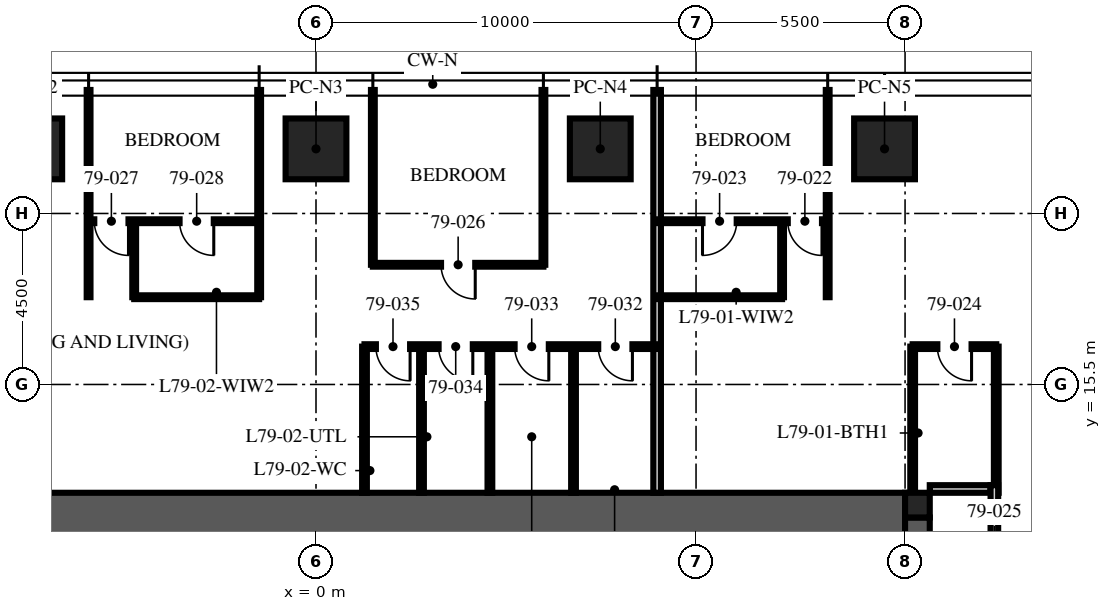
"""IFC4 building model, lengths in metres.
Left out: names, types, materials, properties, quantities, classifications, styles, units other than length and angle.
Written with IfcOpenShell. Run it as: python <this file> out.ifc"""

import sys

from ifc_helpers import new_model, si_unit, direction, frame, frame_2d, origin, origin_2d, place, context, subcontext, project, spatial, rectangle, extrude, element, fill, save


model = new_model("IFC4")
c1 = context("Model", 3, precision=1e-05, world=origin(), true_north=direction((0.0, 1.0)))
c2 = subcontext(c1, "Body", "Model", "MODEL_VIEW")
j1 = project(units=[si_unit("LENGTHUNIT", "METRE"), si_unit("PLANEANGLEUNIT", "RADIAN")], contexts=[c1])
p1 = place(None, origin())
s1 = spatial("IfcSite", under=j1, at=p1, CompositionType="ELEMENT")
p2 = place(p1, origin())
s2 = spatial("IfcBuilding", under=s1, at=p2, CompositionType="ELEMENT")
p3 = place(p2, frame((0.0, 0.0, 315.75)))
s3 = spatial("IfcBuildingStorey", under=s2, at=p3, CompositionType="ELEMENT", Elevation=315.75)
p4 = place(p3, frame((15.5, -12.0, -0.25), z_axis=(0.0, 0.0, 1.0), x_axis=(0.0, 1.0, 0.0)))
e1 = element("IfcWall", 1, at=p4, inside=s3, PredefinedType="SHEAR", context=c2, shape_type="SweptSolid", body=[
    extrude(rectangle(XDim=24.0, YDim=1.3, at=frame_2d((12.0, 0.0))), origin(), (0.0, 0.0, 1.0), 3.75),
])
p5 = place(p4, frame((3.125, 0.0, 0.25)))
e2 = element("IfcOpeningElement", 2, at=p5, cuts=e1, PredefinedType="OPENING", context=c2, shape_type="SweptSolid", body=[
    extrude(rectangle(XDim=1.2, YDim=2.1, at=frame_2d((0.6, 1.05))), frame((0.0, 0.66, 0.0), z_axis=(0.0, -1.0, 0.0), x_axis=(1.0, 0.0, 0.0)), (0.0, 0.0, 1.0), 1.32),
])
p6 = place(p4, frame((19.375, 0.0, 0.25)))
e3 = element("IfcOpeningElement", 3, at=p6, cuts=e1, PredefinedType="OPENING", context=c2, shape_type="SweptSolid", body=[
    extrude(rectangle(XDim=1.8, YDim=2.1, at=frame_2d((0.9, 1.05))), frame((0.0, 0.66, 0.0), z_axis=(0.0, -1.0, 0.0), x_axis=(1.0, 0.0, 0.0)), (0.0, 0.0, 1.0), 1.32),
])
p7 = place(p3, frame((-15.5, 12.0, -0.25), z_axis=(0.0, 0.0, 1.0), x_axis=(1.0, 0.0, 0.0)))
e4 = element("IfcWall", 4, at=p7, inside=s3, PredefinedType="SHEAR", context=c2, shape_type="SweptSolid", body=[
    extrude(rectangle(XDim=31.0, YDim=1.3, at=frame_2d((15.5, 0.0))), origin(), (0.0, 0.0, 1.0), 3.75),
])
p8 = place(p3, frame((15.825, 12.325, -0.25), z_axis=(0.0, 0.0, 1.0), x_axis=(1.0, 0.0, 0.0)))
e5 = element("IfcColumn", 5, at=p8, inside=s3, PredefinedType="COLUMN", context=c2, shape_type="SweptSolid", body=[
    extrude(rectangle(XDim=0.65, YDim=0.65, at=origin_2d()), origin(), (0.0, 0.0, 1.0), 3.75),
])
for number, where, z_axis, x_axis in (
    (6, (-7.48, 21.7, 0.0), (0.0, 0.0, 1.0), (1.0, 0.0, 0.0)),
    (7, (0.0, 21.7, 0.0), (0.0, 0.0, 1.0), (1.0, 0.0, 0.0)),
    (8, (7.48, 21.7, 0.0), (0.0, 0.0, 1.0), (1.0, 0.0, 0.0)),
    (9, (14.96, 21.7, 0.0), (0.0, 0.0, 1.0), (1.0, 0.0, 0.0)),
):
    element("IfcColumn", number, at=place(p3, frame(where, z_axis=z_axis, x_axis=x_axis)), inside=s3, PredefinedType="COLUMN", context=c2, shape_type="SweptSolid", body=[
        extrude(rectangle(XDim=1.6, YDim=1.6, at=origin_2d()), origin(), (0.0, 0.0, 1.0), 3.75),
    ])
p9 = place(p3, frame((16.15, 12.75, 0.0), z_axis=(0.0, 0.0, 1.0), x_axis=(1.0, 0.0, 0.0)))
e10 = element("IfcWall", 10, at=p9, inside=s3, PredefinedType="PARTITIONING", context=c2, shape_type="SweptSolid", body=[
    extrude(rectangle(XDim=1.6, YDim=0.2, at=frame_2d((0.8, 0.0))), origin(), (0.0, 0.0, 1.0), 2.6),
])
p10 = place(p3, frame((13.464, 17.796, 0.0), z_axis=(0.0, 0.0, 1.0), x_axis=(0.0, 1.0, 0.0)))
e11 = element("IfcWall", 11, at=p10, inside=s3, PredefinedType="PARTITIONING", context=c2, shape_type="SweptSolid", body=[
    extrude(rectangle(XDim=5.454, YDim=0.1, at=frame_2d((2.727, 0.0))), origin(), (0.0, 0.0, 1.0), 3.01),
])
p11 = place(p3, frame((8.976, 12.65, 0.0), z_axis=(0.0, 0.0, 1.0), x_axis=(0.0, 1.0, 0.0)))
e12 = element("IfcWall", 12, at=p11, inside=s3, PredefinedType="PARTITIONING", context=c2, shape_type="SweptSolid", body=[
    extrude(rectangle(XDim=10.6, YDim=0.2, at=frame_2d((5.3, 0.0))), origin(), (0.0, 0.0, 1.0), 3.01),
])
for number, where, z_axis, x_axis in (
    (13, (5.984, 18.65, 0.0), (0.0, 0.0, 1.0), (0.0, 1.0, 0.0)),
    (14, (1.496, 18.65, 0.0), (0.0, 0.0, 1.0), (0.0, 1.0, 0.0)),
):
    element("IfcWall", number, at=place(p3, frame(where, z_axis=z_axis, x_axis=x_axis)), inside=s3, PredefinedType="PARTITIONING", context=c2, shape_type="SweptSolid", body=[
        extrude(rectangle(XDim=4.6, YDim=0.1, at=frame_2d((2.3, 0.0))), origin(), (0.0, 0.0, 1.0), 3.01),
    ])
for number, where, z_axis, x_axis in (
    (15, (-1.496, 17.796, 0.0), (0.0, 0.0, 1.0), (0.0, 1.0, 0.0)),
    (16, (-5.984, 17.796, 0.0), (0.0, 0.0, 1.0), (0.0, 1.0, 0.0)),
):
    element("IfcWall", number, at=place(p3, frame(where, z_axis=z_axis, x_axis=x_axis)), inside=s3, PredefinedType="PARTITIONING", context=c2, shape_type="SweptSolid", body=[
        extrude(rectangle(XDim=5.454, YDim=0.1, at=frame_2d((2.727, 0.0))), origin(), (0.0, 0.0, 1.0), 3.01),
    ])
p12 = place(p3, frame((13.464, 19.796, 0.0), z_axis=(0.0, 0.0, 1.0), x_axis=(-1.0, 0.0, 0.0)))
e17 = element("IfcWall", 17, at=p12, inside=s3, PredefinedType="PARTITIONING", context=c2, shape_type="SweptSolid", body=[
    extrude(rectangle(XDim=4.488, YDim=0.1, at=frame_2d((2.244, 0.0))), origin(), (0.0, 0.0, 1.0), 2.91),
])
p13 = place(p12, frame((0.15, 0.0, 0.0)))
e18 = element("IfcOpeningElement", 18, at=p13, cuts=e17, PredefinedType="OPENING", context=c2, shape_type="SweptSolid", body=[
    extrude(rectangle(XDim=0.9, YDim=2.1, at=frame_2d((0.45, 1.05))), frame((0.0, 0.06, 0.0), z_axis=(0.0, -1.0, 0.0), x_axis=(1.0, 0.0, 0.0)), (0.0, 0.0, 1.0), 0.12),
])
p14 = place(p12, frame((2.394, 0.0, 0.0)))
e19 = element("IfcOpeningElement", 19, at=p14, cuts=e17, PredefinedType="OPENING", context=c2, shape_type="SweptSolid", body=[
    extrude(rectangle(XDim=0.9, YDim=2.1, at=frame_2d((0.45, 1.05))), frame((0.0, 0.06, 0.0), z_axis=(0.0, -1.0, 0.0), x_axis=(1.0, 0.0, 0.0)), (0.0, 0.0, 1.0), 0.12),
])
p15 = place(p3, frame((12.264, 17.796, 0.0), z_axis=(0.0, 0.0, 1.0), x_axis=(0.0, 1.0, 0.0)))
e20 = element("IfcWall", 20, at=p15, inside=s3, PredefinedType="PARTITIONING", context=c2, shape_type="SweptSolid", body=[
    extrude(rectangle(XDim=2.0, YDim=0.1, at=frame_2d((1.0, 0.0))), origin(), (0.0, 0.0, 1.0), 3.5),
])
p16 = place(p3, frame((12.264, 17.796, 0.0), z_axis=(0.0, 0.0, 1.0), x_axis=(-1.0, 0.0, 0.0)))
e21 = element("IfcWall", 21, at=p16, inside=s3, PredefinedType="PARTITIONING", context=c2, shape_type="SweptSolid", body=[
    extrude(rectangle(XDim=3.288, YDim=0.1, at=frame_2d((1.644, 0.0))), origin(), (0.0, 0.0, 1.0), 2.91),
])
p17 = place(p3, frame((17.9, 16.496, 0.0), z_axis=(0.0, 0.0, 1.0), x_axis=(-1.0, 0.0, 0.0)))
e22 = element("IfcWall", 22, at=p17, inside=s3, PredefinedType="PARTITIONING", context=c2, shape_type="SweptSolid", body=[
    extrude(rectangle(XDim=2.2, YDim=0.125, at=frame_2d((1.1, 0.0))), origin(), (0.0, 0.0, 1.0), 2.91),
])
p18 = place(p17, frame((0.65, 0.0, 0.0)))
e23 = element("IfcOpeningElement", 23, at=p18, cuts=e22, PredefinedType="OPENING", context=c2, shape_type="SweptSolid", body=[
    extrude(rectangle(XDim=0.9, YDim=2.1, at=frame_2d((0.45, 1.05))), frame((0.0, 0.073, 0.0), z_axis=(0.0, -1.0, 0.0), x_axis=(1.0, 0.0, 0.0)), (0.0, 0.0, 1.0), 0.145),
])
for number, where, z_axis, x_axis in (
    (24, (17.9, 12.65, 0.0), (0.0, 0.0, 1.0), (0.0, 1.0, 0.0)),
    (25, (15.7, 12.65, 0.0), (0.0, 0.0, 1.0), (0.0, 1.0, 0.0)),
):
    element("IfcWall", number, at=place(p3, frame(where, z_axis=z_axis, x_axis=x_axis)), inside=s3, PredefinedType="PARTITIONING", context=c2, shape_type="SweptSolid", body=[
        extrude(rectangle(XDim=3.846, YDim=0.125, at=frame_2d((1.923, 0.0))), origin(), (0.0, 0.0, 1.0), 2.6),
    ])
p19 = place(p3, frame((5.984, 18.65, 0.0), z_axis=(0.0, 0.0, 1.0), x_axis=(-1.0, 0.0, 0.0)))
e26 = element("IfcWall", 26, at=p19, inside=s3, PredefinedType="PARTITIONING", context=c2, shape_type="SweptSolid", body=[
    extrude(rectangle(XDim=4.488, YDim=0.1, at=frame_2d((2.244, 0.0))), origin(), (0.0, 0.0, 1.0), 2.91),
])
p20 = place(p19, frame((1.794, 0.0, 0.0)))
e27 = element("IfcOpeningElement", 27, at=p20, cuts=e26, PredefinedType="OPENING", context=c2, shape_type="SweptSolid", body=[
    extrude(rectangle(XDim=0.9, YDim=2.1, at=frame_2d((0.45, 1.05))), frame((0.0, 0.06, 0.0), z_axis=(0.0, -1.0, 0.0), x_axis=(1.0, 0.0, 0.0)), (0.0, 0.0, 1.0), 0.12),
])
p21 = place(p3, frame((-1.496, 19.796, 0.0), z_axis=(0.0, 0.0, 1.0), x_axis=(-1.0, 0.0, 0.0)))
e28 = element("IfcWall", 28, at=p21, inside=s3, PredefinedType="PARTITIONING", context=c2, shape_type="SweptSolid", body=[
    extrude(rectangle(XDim=4.488, YDim=0.1, at=frame_2d((2.244, 0.0))), origin(), (0.0, 0.0, 1.0), 2.91),
])
p22 = place(p21, frame((3.438, 0.0, 0.0)))
e29 = element("IfcOpeningElement", 29, at=p22, cuts=e28, PredefinedType="OPENING", context=c2, shape_type="SweptSolid", body=[
    extrude(rectangle(XDim=0.9, YDim=2.1, at=frame_2d((0.45, 1.05))), frame((0.0, 0.06, 0.0), z_axis=(0.0, -1.0, 0.0), x_axis=(1.0, 0.0, 0.0)), (0.0, 0.0, 1.0), 0.12),
])
p23 = place(p21, frame((1.194, 0.0, 0.0)))
e30 = element("IfcOpeningElement", 30, at=p23, cuts=e28, PredefinedType="OPENING", context=c2, shape_type="SweptSolid", body=[
    extrude(rectangle(XDim=0.9, YDim=2.1, at=frame_2d((0.45, 1.05))), frame((0.0, 0.06, 0.0), z_axis=(0.0, -1.0, 0.0), x_axis=(1.0, 0.0, 0.0)), (0.0, 0.0, 1.0), 0.12),
])
p24 = place(p3, frame((-4.784, 17.796, 0.0), z_axis=(0.0, 0.0, 1.0), x_axis=(0.0, 1.0, 0.0)))
e31 = element("IfcWall", 31, at=p24, inside=s3, PredefinedType="PARTITIONING", context=c2, shape_type="SweptSolid", body=[
    extrude(rectangle(XDim=2.0, YDim=0.1, at=frame_2d((1.0, 0.0))), origin(), (0.0, 0.0, 1.0), 3.5),
])
p25 = place(p3, frame((-1.496, 17.796, 0.0), z_axis=(0.0, 0.0, 1.0), x_axis=(-1.0, 0.0, 0.0)))
e32 = element("IfcWall", 32, at=p25, inside=s3, PredefinedType="PARTITIONING", context=c2, shape_type="SweptSolid", body=[
    extrude(rectangle(XDim=3.288, YDim=0.1, at=frame_2d((1.644, 0.0))), origin(), (0.0, 0.0, 1.0), 2.91),
])
p26 = place(p3, frame((8.976, 16.496, 0.0), z_axis=(0.0, 0.0, 1.0), x_axis=(-1.0, 0.0, 0.0)))
e33 = element("IfcWall", 33, at=p26, inside=s3, PredefinedType="PARTITIONING", context=c2, shape_type="SweptSolid", body=[
    extrude(rectangle(XDim=7.7, YDim=0.125, at=frame_2d((3.85, 0.0))), origin(), (0.0, 0.0, 1.0), 2.9),
])
p27 = place(p26, frame((0.65, 0.0, 0.0)))
e34 = element("IfcOpeningElement", 34, at=p27, cuts=e33, PredefinedType="OPENING", context=c2, shape_type="SweptSolid", body=[
    extrude(rectangle(XDim=0.9, YDim=2.1, at=frame_2d((0.45, 1.05))), frame((0.0, 0.073, 0.0), z_axis=(0.0, -1.0, 0.0), x_axis=(1.0, 0.0, 0.0)), (0.0, 0.0, 1.0), 0.145),
])
p28 = place(p26, frame((2.85, 0.0, 0.0)))
e35 = element("IfcOpeningElement", 35, at=p28, cuts=e33, PredefinedType="OPENING", context=c2, shape_type="SweptSolid", body=[
    extrude(rectangle(XDim=0.9, YDim=2.1, at=frame_2d((0.45, 1.05))), frame((0.0, 0.073, 0.0), z_axis=(0.0, -1.0, 0.0), x_axis=(1.0, 0.0, 0.0)), (0.0, 0.0, 1.0), 0.145),
])
p29 = place(p26, frame((4.85, 0.0, 0.0)))
e36 = element("IfcOpeningElement", 36, at=p29, cuts=e33, PredefinedType="OPENING", context=c2, shape_type="SweptSolid", body=[
    extrude(rectangle(XDim=0.9, YDim=2.1, at=frame_2d((0.45, 1.05))), frame((0.0, 0.073, 0.0), z_axis=(0.0, -1.0, 0.0), x_axis=(1.0, 0.0, 0.0)), (0.0, 0.0, 1.0), 0.145),
])
p30 = place(p26, frame((6.5, 0.0, 0.0)))
e37 = element("IfcOpeningElement", 37, at=p30, cuts=e33, PredefinedType="OPENING", context=c2, shape_type="SweptSolid", body=[
    extrude(rectangle(XDim=0.9, YDim=2.1, at=frame_2d((0.45, 1.05))), frame((0.0, 0.073, 0.0), z_axis=(0.0, -1.0, 0.0), x_axis=(1.0, 0.0, 0.0)), (0.0, 0.0, 1.0), 0.145),
])
for number, where, z_axis, x_axis in (
    (38, (6.776, 12.65, 0.0), (0.0, 0.0, 1.0), (0.0, 1.0, 0.0)),
    (39, (4.576, 12.65, 0.0), (0.0, 0.0, 1.0), (0.0, 1.0, 0.0)),
    (40, (2.776, 12.65, 0.0), (0.0, 0.0, 1.0), (0.0, 1.0, 0.0)),
    (41, (1.276, 12.65, 0.0), (0.0, 0.0, 1.0), (0.0, 1.0, 0.0)),
):
    element("IfcWall", number, at=place(p3, frame(where, z_axis=z_axis, x_axis=x_axis)), inside=s3, PredefinedType="PARTITIONING", context=c2, shape_type="SweptSolid", body=[
        extrude(rectangle(XDim=3.846, YDim=0.125, at=frame_2d((1.923, 0.0))), origin(), (0.0, 0.0, 1.0), 3.5),
    ])
p31 = place(p3, frame((17.85, -12.65, 0.0), z_axis=(0.0, 0.0, 1.0), x_axis=(0.0, 1.0, 0.0)))
e42 = element("IfcWall", 42, at=p31, inside=s3, PredefinedType="PARTITIONING", context=c2, shape_type="SweptSolid", body=[
    extrude(rectangle(XDim=25.5, YDim=0.2, at=frame_2d((12.75, 0.0))), origin(), (0.0, 0.0, 1.0), 2.9),
])
p32 = place(p31, frame((23.186, 0.0, 0.0)))
e43 = element("IfcOpeningElement", 43, at=p32, cuts=e42, PredefinedType="OPENING", context=c2, shape_type="SweptSolid", body=[
    extrude(rectangle(XDim=1.0, YDim=2.2, at=frame_2d((0.5, 1.1))), frame((0.0, 0.11, 0.0), z_axis=(0.0, -1.0, 0.0), x_axis=(1.0, 0.0, 0.0)), (0.0, 0.0, 1.0), 0.22),
])
p33 = place(p31, frame((4.9, 0.0, 0.0)))
e44 = element("IfcOpeningElement", 44, at=p33, cuts=e42, PredefinedType="OPENING", context=c2, shape_type="SweptSolid", body=[
    extrude(rectangle(XDim=1.0, YDim=2.2, at=frame_2d((0.5, 1.1))), frame((0.0, 0.11, 0.0), z_axis=(0.0, -1.0, 0.0), x_axis=(1.0, 0.0, 0.0)), (0.0, 0.0, 1.0), 0.22),
])
p34 = place(p13, origin())
e45 = element("IfcDoor", 45, at=p34, inside=s3, OperationType="SINGLE_SWING_LEFT", PredefinedType="DOOR", context=c2, shape_type="SweptSolid", body=[
    extrude(rectangle(XDim=0.9, YDim=2.1, at=frame_2d((0.45, 1.05))), frame((0.0, 0.025, 0.0), z_axis=(0.0, -1.0, 0.0), x_axis=(1.0, 0.0, 0.0)), (0.0, 0.0, 1.0), 0.05),
])
fill(e18, e45)
p35 = place(p14, origin())
e46 = element("IfcDoor", 46, at=p35, inside=s3, OperationType="SINGLE_SWING_RIGHT", PredefinedType="DOOR", context=c2, shape_type="SweptSolid", body=[
    extrude(rectangle(XDim=0.9, YDim=2.1, at=frame_2d((0.45, 1.05))), frame((0.0, 0.025, 0.0), z_axis=(0.0, -1.0, 0.0), x_axis=(1.0, 0.0, 0.0)), (0.0, 0.0, 1.0), 0.05),
])
fill(e19, e46)
p36 = place(p18, origin())
e47 = element("IfcDoor", 47, at=p36, inside=s3, OperationType="SINGLE_SWING_LEFT", PredefinedType="DOOR", context=c2, shape_type="SweptSolid", body=[
    extrude(rectangle(XDim=0.9, YDim=2.1, at=frame_2d((0.45, 1.05))), frame((0.0, 0.025, 0.0), z_axis=(0.0, -1.0, 0.0), x_axis=(1.0, 0.0, 0.0)), (0.0, 0.0, 1.0), 0.05),
])
fill(e23, e47)
p37 = place(p20, origin())
e48 = element("IfcDoor", 48, at=p37, inside=s3, OperationType="SINGLE_SWING_LEFT", PredefinedType="DOOR", context=c2, shape_type="SweptSolid", body=[
    extrude(rectangle(XDim=0.9, YDim=2.1, at=frame_2d((0.45, 1.05))), frame((0.0, 0.025, 0.0), z_axis=(0.0, -1.0, 0.0), x_axis=(1.0, 0.0, 0.0)), (0.0, 0.0, 1.0), 0.05),
])
fill(e27, e48)
p38 = place(p22, origin())
e49 = element("IfcDoor", 49, at=p38, inside=s3, OperationType="SINGLE_SWING_LEFT", PredefinedType="DOOR", context=c2, shape_type="SweptSolid", body=[
    extrude(rectangle(XDim=0.9, YDim=2.1, at=frame_2d((0.45, 1.05))), frame((0.0, 0.025, 0.0), z_axis=(0.0, -1.0, 0.0), x_axis=(1.0, 0.0, 0.0)), (0.0, 0.0, 1.0), 0.05),
])
fill(e29, e49)
p39 = place(p23, origin())
e50 = element("IfcDoor", 50, at=p39, inside=s3, OperationType="SINGLE_SWING_LEFT", PredefinedType="DOOR", context=c2, shape_type="SweptSolid", body=[
    extrude(rectangle(XDim=0.9, YDim=2.1, at=frame_2d((0.45, 1.05))), frame((0.0, 0.025, 0.0), z_axis=(0.0, -1.0, 0.0), x_axis=(1.0, 0.0, 0.0)), (0.0, 0.0, 1.0), 0.05),
])
fill(e30, e50)
p40 = place(p27, origin())
e51 = element("IfcDoor", 51, at=p40, inside=s3, OperationType="SINGLE_SWING_LEFT", PredefinedType="DOOR", context=c2, shape_type="SweptSolid", body=[
    extrude(rectangle(XDim=0.9, YDim=2.1, at=frame_2d((0.45, 1.05))), frame((0.0, 0.025, 0.0), z_axis=(0.0, -1.0, 0.0), x_axis=(1.0, 0.0, 0.0)), (0.0, 0.0, 1.0), 0.05),
])
fill(e34, e51)
p41 = place(p28, origin())
e52 = element("IfcDoor", 52, at=p41, inside=s3, OperationType="SINGLE_SWING_LEFT", PredefinedType="DOOR", context=c2, shape_type="SweptSolid", body=[
    extrude(rectangle(XDim=0.9, YDim=2.1, at=frame_2d((0.45, 1.05))), frame((0.0, 0.025, 0.0), z_axis=(0.0, -1.0, 0.0), x_axis=(1.0, 0.0, 0.0)), (0.0, 0.0, 1.0), 0.05),
])
fill(e35, e52)
p42 = place(p29, origin())
e53 = element("IfcDoor", 53, at=p42, inside=s3, OperationType="SINGLE_SWING_LEFT", PredefinedType="DOOR", context=c2, shape_type="SweptSolid", body=[
    extrude(rectangle(XDim=0.9, YDim=2.1, at=frame_2d((0.45, 1.05))), frame((0.0, 0.025, 0.0), z_axis=(0.0, -1.0, 0.0), x_axis=(1.0, 0.0, 0.0)), (0.0, 0.0, 1.0), 0.05),
])
fill(e36, e53)
p43 = place(p30, origin())
e54 = element("IfcDoor", 54, at=p43, inside=s3, OperationType="SINGLE_SWING_LEFT", PredefinedType="DOOR", context=c2, shape_type="SweptSolid", body=[
    extrude(rectangle(XDim=0.9, YDim=2.1, at=frame_2d((0.45, 1.05))), frame((0.0, 0.025, 0.0), z_axis=(0.0, -1.0, 0.0), x_axis=(1.0, 0.0, 0.0)), (0.0, 0.0, 1.0), 0.05),
])
fill(e37, e54)
save(model, sys.argv[1])
